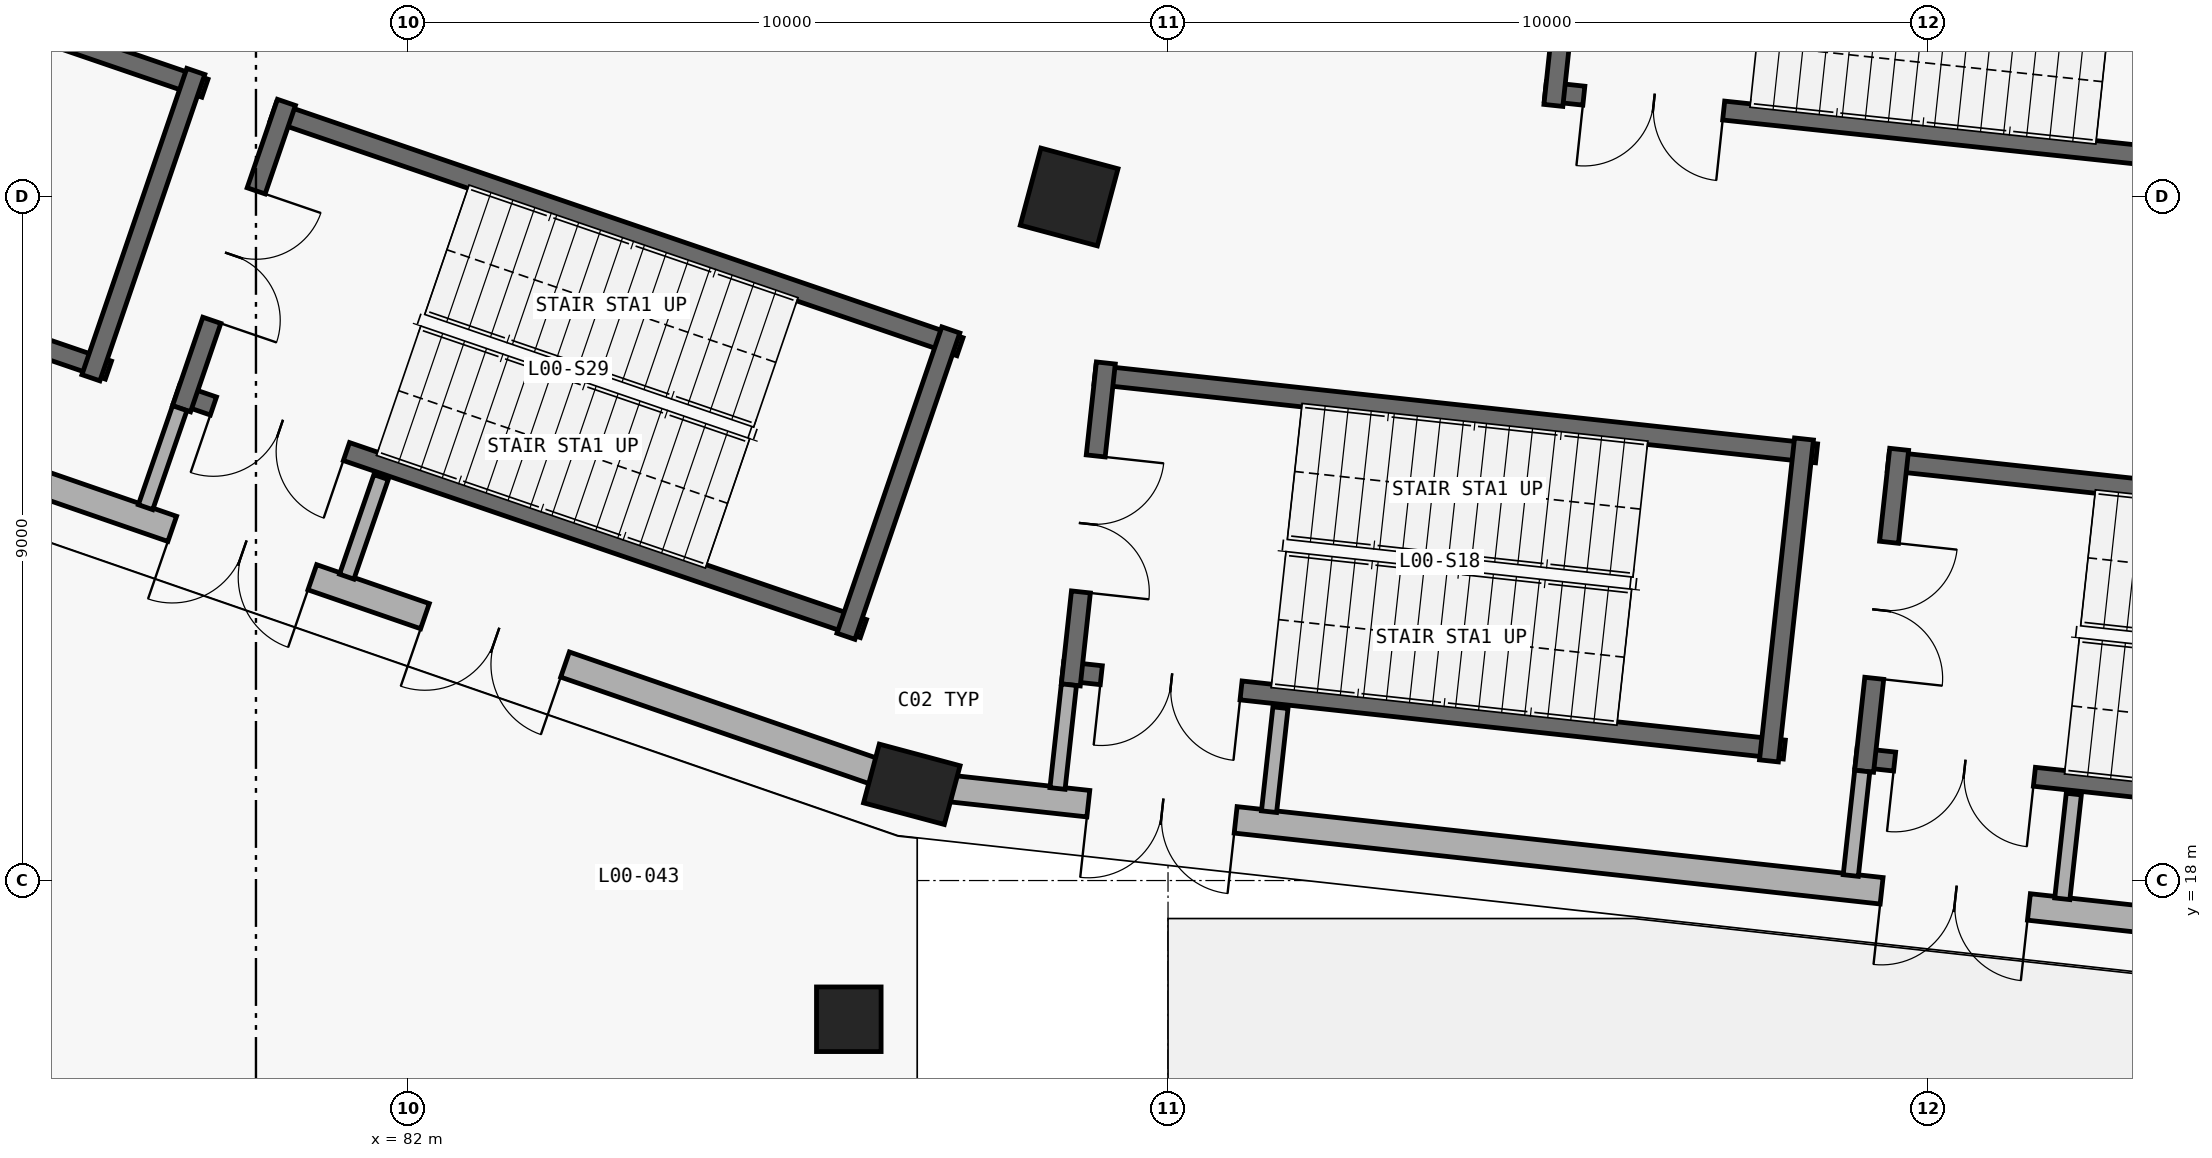
"""IFC4 building model, lengths in metres.
Left out: names, types, materials, properties, quantities, classifications, styles, units other than length and angle.
Written with IfcOpenShell. Run it as: python <this file> out.ifc"""

import sys

from ifc_helpers import new_model, si_unit, direction, frame, frame_2d, origin, origin_2d, place, context, subcontext, project, spatial, rectangle, circle, extrude, element, fill, save


model = new_model("IFC4")
c1 = context("Model", 3, precision=1e-05, world=origin(), true_north=direction((0.0, 1.0)))
c2 = subcontext(c1, "Body", "Model", "MODEL_VIEW")
j1 = project(units=[si_unit("LENGTHUNIT", "METRE"), si_unit("PLANEANGLEUNIT", "RADIAN")], contexts=[c1])
p1 = place(None, origin())
s1 = spatial("IfcSite", under=j1, at=p1, CompositionType="ELEMENT")
p2 = place(p1, origin())
s2 = spatial("IfcBuilding", under=s1, at=p2, CompositionType="ELEMENT")
p3 = place(p2, origin())
s3 = spatial("IfcBuildingStorey", under=s2, at=p3, CompositionType="ELEMENT", Elevation=0.0)
p4 = place(p3, frame((88.629, 19.266, 0.0), z_axis=(0.0, 0.0, 1.0), x_axis=(0.258819045103, 0.965925826289, 0.0)))
e1 = element("IfcColumn", 1, at=p4, inside=s3, PredefinedType="COLUMN", context=c2, shape_type="SweptSolid", body=[
    extrude(rectangle(XDim=0.8, YDim=1.1, at=origin_2d()), origin(), (0.0, 0.0, 1.0), 5.4),
])
p5 = place(p3, frame((90.699, 26.993, 0.0), z_axis=(0.0, 0.0, 1.0), x_axis=(0.258819045103, 0.965925826289, 0.0)))
e2 = element("IfcColumn", 2, at=p5, inside=s3, PredefinedType="COLUMN", context=c2, shape_type="SweptSolid", body=[
    extrude(rectangle(XDim=1.05, YDim=1.05, at=origin_2d()), origin(), (0.0, 0.0, 1.0), 5.4),
])
p6 = place(p3, frame((87.8, 16.175, 0.0), z_axis=(0.0, 0.0, 1.0), x_axis=(1.0, 0.0, 0.0)))
e3 = element("IfcColumn", 3, at=p6, inside=s3, PredefinedType="COLUMN", context=c2, shape_type="SweptSolid", body=[
    extrude(circle(Radius=0.425, at=origin_2d()), origin(), (0.0, 0.0, 1.0), 5.4),
])
p7 = place(p3, frame((88.131, 19.438, 0.0), z_axis=(0.0, 0.0, 1.0), x_axis=(-0.945215757663, 0.326446276538, 0.0)))
e4 = element("IfcWall", 4, at=p7, inside=s3, PredefinedType="STANDARD", context=c2, shape_type="SweptSolid", body=[
    extrude(rectangle(XDim=21.979, YDim=0.35, at=frame_2d((10.99, 0.0))), origin(), (0.0, 0.0, 1.0), 4.165),
])
p8 = place(p7, frame((18.318, 0.0, 0.0)))
e5 = element("IfcOpeningElement", 5, at=p8, cuts=e4, PredefinedType="OPENING", context=c2, shape_type="SweptSolid", body=[
    extrude(rectangle(XDim=1.95, YDim=2.25, at=frame_2d((0.975, 1.125))), frame((0.0, 0.185, 0.0), z_axis=(0.0, -1.0, 0.0), x_axis=(1.0, 0.0, 0.0)), (0.0, 0.0, 1.0), 0.37),
])
p9 = place(p7, frame((7.818, 0.0, 0.0)))
e6 = element("IfcOpeningElement", 6, at=p9, cuts=e4, PredefinedType="OPENING", context=c2, shape_type="SweptSolid", body=[
    extrude(rectangle(XDim=1.95, YDim=2.25, at=frame_2d((0.975, 1.125))), frame((0.0, 0.185, 0.0), z_axis=(0.0, -1.0, 0.0), x_axis=(1.0, 0.0, 0.0)), (0.0, 0.0, 1.0), 0.37),
])
p10 = place(p7, frame((4.3, 0.0, 0.0)))
e7 = element("IfcOpeningElement", 7, at=p10, cuts=e4, PredefinedType="OPENING", context=c2, shape_type="SweptSolid", body=[
    extrude(rectangle(XDim=1.95, YDim=2.25, at=frame_2d((0.975, 1.125))), frame((0.0, 0.185, 0.0), z_axis=(0.0, -1.0, 0.0), x_axis=(1.0, 0.0, 0.0)), (0.0, 0.0, 1.0), 0.37),
])
p11 = place(p3, frame((111.475, 16.758, 0.0), z_axis=(0.0, 0.0, 1.0), x_axis=(-0.994028735725, 0.10911861689, 0.0)))
e8 = element("IfcWall", 8, at=p11, inside=s3, PredefinedType="STANDARD", context=c2, shape_type="SweptSolid", body=[
    extrude(rectangle(XDim=22.452, YDim=0.35, at=frame_2d((11.226, 0.0))), origin(), (0.0, 0.0, 1.0), 4.165),
])
p12 = place(p11, frame((18.697, 0.0, 0.0)))
e9 = element("IfcOpeningElement", 9, at=p12, cuts=e8, PredefinedType="OPENING", context=c2, shape_type="SweptSolid", body=[
    extrude(rectangle(XDim=1.95, YDim=2.25, at=frame_2d((0.975, 1.125))), frame((0.0, 0.185, 0.0), z_axis=(0.0, -1.0, 0.0), x_axis=(1.0, 0.0, 0.0)), (0.0, 0.0, 1.0), 0.37),
])
p13 = place(p11, frame((8.197, 0.0, 0.0)))
e10 = element("IfcOpeningElement", 10, at=p13, cuts=e8, PredefinedType="OPENING", context=c2, shape_type="SweptSolid", body=[
    extrude(rectangle(XDim=1.95, YDim=2.25, at=frame_2d((0.975, 1.125))), frame((0.0, 0.185, 0.0), z_axis=(0.0, -1.0, 0.0), x_axis=(1.0, 0.0, 0.0)), (0.0, 0.0, 1.0), 0.37),
])
p14 = place(p11, frame((4.413, 0.0, 0.0)))
e11 = element("IfcOpeningElement", 11, at=p14, cuts=e8, PredefinedType="OPENING", context=c2, shape_type="SweptSolid", body=[
    extrude(rectangle(XDim=1.95, YDim=2.25, at=frame_2d((0.975, 1.125))), frame((0.0, 0.185, 0.0), z_axis=(0.0, -1.0, 0.0), x_axis=(1.0, 0.0, 0.0)), (0.0, 0.0, 1.0), 0.37),
])
p15 = place(p3, frame((78.059, 24.715, 0.0), z_axis=(0.0, 0.0, 1.0), x_axis=(-0.946064424228, 0.323978556712, 0.0)))
e12 = element("IfcWall", 12, at=p15, inside=s3, PredefinedType="SHEAR", context=c2, shape_type="SweptSolid", body=[
    extrude(rectangle(XDim=9.55, YDim=0.25, at=frame_2d((4.775, 0.0))), origin(), (0.0, 0.0, 1.0), 5.1),
])
p16 = place(p15, frame((7.19, 0.0, 0.0)))
e13 = element("IfcOpeningElement", 13, at=p16, cuts=e12, PredefinedType="OPENING", context=c2, shape_type="SweptSolid", body=[
    extrude(rectangle(XDim=1.85, YDim=2.3, at=frame_2d((0.925, 1.15))), frame((0.0, 0.135, 0.0), z_axis=(0.0, -1.0, 0.0), x_axis=(1.0, 0.0, 0.0)), (0.0, 0.0, 1.0), 0.27),
])
p17 = place(p3, frame((79.328, 28.424, 0.0), z_axis=(0.0, 0.0, 1.0), x_axis=(-0.946064424228, 0.323978556712, 0.0)))
e14 = element("IfcWall", 14, at=p17, inside=s3, PredefinedType="SHEAR", context=c2, shape_type="SweptSolid", body=[
    extrude(rectangle(XDim=9.55, YDim=0.25, at=frame_2d((4.775, 0.0))), origin(), (0.0, 0.0, 1.0), 5.1),
])
p18 = place(p3, frame((77.828, 24.615, 0.0), z_axis=(0.0, 0.0, 1.0), x_axis=(0.323971192516, 0.946066946056, 0.0)))
e15 = element("IfcWall", 15, at=p18, inside=s3, PredefinedType="SHEAR", context=c2, shape_type="SweptSolid", body=[
    extrude(rectangle(XDim=4.26, YDim=0.25, at=frame_2d((2.13, 0.0))), origin(), (0.0, 0.0, 1.0), 5.1),
])
p19 = place(p3, frame((100.109, 19.723, 0.0), z_axis=(0.0, 0.0, 1.0), x_axis=(-0.994127555169, 0.108214620337, 0.0)))
e16 = element("IfcWall", 16, at=p19, inside=s3, PredefinedType="SHEAR", context=c2, shape_type="SweptSolid", body=[
    extrude(rectangle(XDim=9.55, YDim=0.25, at=frame_2d((4.775, 0.0))), origin(), (0.0, 0.0, 1.0), 5.1),
])
p20 = place(p19, frame((7.19, 0.0, 0.0)))
e17 = element("IfcOpeningElement", 17, at=p20, cuts=e16, PredefinedType="OPENING", context=c2, shape_type="SweptSolid", body=[
    extrude(rectangle(XDim=1.85, YDim=2.3, at=frame_2d((0.925, 1.15))), frame((0.0, 0.135, 0.0), z_axis=(0.0, -1.0, 0.0), x_axis=(1.0, 0.0, 0.0)), (0.0, 0.0, 1.0), 0.27),
])
p21 = place(p3, frame((100.533, 23.62, 0.0), z_axis=(0.0, 0.0, 1.0), x_axis=(-0.994127555169, 0.108214620337, 0.0)))
e18 = element("IfcWall", 18, at=p21, inside=s3, PredefinedType="SHEAR", context=c2, shape_type="SweptSolid", body=[
    extrude(rectangle(XDim=9.55, YDim=0.25, at=frame_2d((4.775, 0.0))), origin(), (0.0, 0.0, 1.0), 5.1),
])
p22 = place(p3, frame((91.182, 24.809, 0.0), z_axis=(0.0, 0.0, 1.0), x_axis=(-0.108198315262, -0.994129329903, 0.0)))
e19 = element("IfcWall", 19, at=p22, inside=s3, PredefinedType="SHEAR", context=c2, shape_type="SweptSolid", body=[
    extrude(rectangle(XDim=4.26, YDim=0.25, at=frame_2d((2.13, 0.0))), origin(), (0.0, 0.0, 1.0), 5.1),
])
p23 = place(p22, frame((1.23, 0.0, 0.0)))
e20 = element("IfcOpeningElement", 20, at=p23, cuts=e19, PredefinedType="OPENING", context=c2, shape_type="SweptSolid", body=[
    extrude(rectangle(XDim=1.8, YDim=2.25, at=frame_2d((0.9, 1.125))), frame((0.0, 0.135, 0.0), z_axis=(0.0, -1.0, 0.0), x_axis=(1.0, 0.0, 0.0)), (0.0, 0.0, 1.0), 0.27),
])
p24 = place(p3, frame((99.906, 19.574, 0.0), z_axis=(0.0, 0.0, 1.0), x_axis=(0.108198315262, 0.994129329903, 0.0)))
e21 = element("IfcWall", 21, at=p24, inside=s3, PredefinedType="SHEAR", context=c2, shape_type="SweptSolid", body=[
    extrude(rectangle(XDim=4.26, YDim=0.25, at=frame_2d((2.13, 0.0))), origin(), (0.0, 0.0, 1.0), 5.1),
])
p25 = place(p3, frame((87.992, 21.314, 0.0), z_axis=(0.0, 0.0, 1.0), x_axis=(-0.946072259645, 0.323955675256, 0.0)))
e22 = element("IfcWall", 22, at=p25, inside=s3, PredefinedType="SHEAR", context=c2, shape_type="SweptSolid", body=[
    extrude(rectangle(XDim=9.55, YDim=0.25, at=frame_2d((4.775, 0.0))), origin(), (0.0, 0.0, 1.0), 5.1),
])
p26 = place(p25, frame((7.19, 0.0, 0.0)))
e23 = element("IfcOpeningElement", 23, at=p26, cuts=e22, PredefinedType="OPENING", context=c2, shape_type="SweptSolid", body=[
    extrude(rectangle(XDim=1.85, YDim=2.3, at=frame_2d((0.925, 1.15))), frame((0.0, 0.135, 0.0), z_axis=(0.0, -1.0, 0.0), x_axis=(1.0, 0.0, 0.0)), (0.0, 0.0, 1.0), 0.27),
])
p27 = place(p3, frame((89.262, 25.023, 0.0), z_axis=(0.0, 0.0, 1.0), x_axis=(-0.946064424228, 0.323978556712, 0.0)))
e24 = element("IfcWall", 24, at=p27, inside=s3, PredefinedType="SHEAR", context=c2, shape_type="SweptSolid", body=[
    extrude(rectangle(XDim=9.55, YDim=0.25, at=frame_2d((4.775, 0.0))), origin(), (0.0, 0.0, 1.0), 5.1),
])
p28 = place(p3, frame((80.401, 28.237, 0.0), z_axis=(0.0, 0.0, 1.0), x_axis=(-0.323971192516, -0.946066946056, 0.0)))
e25 = element("IfcWall", 25, at=p28, inside=s3, PredefinedType="SHEAR", context=c2, shape_type="SweptSolid", body=[
    extrude(rectangle(XDim=4.26, YDim=0.25, at=frame_2d((2.13, 0.0))), origin(), (0.0, 0.0, 1.0), 5.1),
])
p29 = place(p28, frame((1.23, 0.0, 0.0)))
e26 = element("IfcOpeningElement", 26, at=p29, cuts=e25, PredefinedType="OPENING", context=c2, shape_type="SweptSolid", body=[
    extrude(rectangle(XDim=1.8, YDim=2.25, at=frame_2d((0.9, 1.125))), frame((0.0, 0.135, 0.0), z_axis=(0.0, -1.0, 0.0), x_axis=(1.0, 0.0, 0.0)), (0.0, 0.0, 1.0), 0.27),
])
p30 = place(p3, frame((87.762, 21.213, 0.0), z_axis=(0.0, 0.0, 1.0), x_axis=(0.323971192516, 0.946066946056, 0.0)))
e27 = element("IfcWall", 27, at=p30, inside=s3, PredefinedType="SHEAR", context=c2, shape_type="SweptSolid", body=[
    extrude(rectangle(XDim=4.26, YDim=0.25, at=frame_2d((2.13, 0.0))), origin(), (0.0, 0.0, 1.0), 5.1),
])
p31 = place(p3, frame((110.547, 18.587, 0.0), z_axis=(0.0, 0.0, 1.0), x_axis=(-0.994127555169, 0.108214620337, 0.0)))
e28 = element("IfcWall", 28, at=p31, inside=s3, PredefinedType="SHEAR", context=c2, shape_type="SweptSolid", body=[
    extrude(rectangle(XDim=9.55, YDim=0.25, at=frame_2d((4.775, 0.0))), origin(), (0.0, 0.0, 1.0), 5.1),
])
p32 = place(p31, frame((7.19, 0.0, 0.0)))
e29 = element("IfcOpeningElement", 29, at=p32, cuts=e28, PredefinedType="OPENING", context=c2, shape_type="SweptSolid", body=[
    extrude(rectangle(XDim=1.85, YDim=2.3, at=frame_2d((0.925, 1.15))), frame((0.0, 0.135, 0.0), z_axis=(0.0, -1.0, 0.0), x_axis=(1.0, 0.0, 0.0)), (0.0, 0.0, 1.0), 0.27),
])
p33 = place(p3, frame((110.971, 22.484, 0.0), z_axis=(0.0, 0.0, 1.0), x_axis=(-0.994127555169, 0.108214620337, 0.0)))
e30 = element("IfcWall", 30, at=p33, inside=s3, PredefinedType="SHEAR", context=c2, shape_type="SweptSolid", body=[
    extrude(rectangle(XDim=9.55, YDim=0.25, at=frame_2d((4.775, 0.0))), origin(), (0.0, 0.0, 1.0), 5.1),
])
p34 = place(p3, frame((101.62, 23.673, 0.0), z_axis=(0.0, 0.0, 1.0), x_axis=(-0.108198315262, -0.994129329903, 0.0)))
e31 = element("IfcWall", 31, at=p34, inside=s3, PredefinedType="SHEAR", context=c2, shape_type="SweptSolid", body=[
    extrude(rectangle(XDim=4.26, YDim=0.25, at=frame_2d((2.13, 0.0))), origin(), (0.0, 0.0, 1.0), 5.1),
])
p35 = place(p34, frame((1.23, 0.0, 0.0)))
e32 = element("IfcOpeningElement", 32, at=p35, cuts=e31, PredefinedType="OPENING", context=c2, shape_type="SweptSolid", body=[
    extrude(rectangle(XDim=1.8, YDim=2.25, at=frame_2d((0.9, 1.125))), frame((0.0, 0.135, 0.0), z_axis=(0.0, -1.0, 0.0), x_axis=(1.0, 0.0, 0.0)), (0.0, 0.0, 1.0), 0.27),
])
p36 = place(p3, frame((106.361, 27.38, 0.0), z_axis=(0.0, 0.0, 1.0), x_axis=(-0.994382608826, 0.105845298736, 0.0)))
e33 = element("IfcWall", 33, at=p36, inside=s3, PredefinedType="SHEAR", context=c2, shape_type="SweptSolid", body=[
    extrude(rectangle(XDim=9.45, YDim=0.25, at=frame_2d((4.725, 0.0))), origin(), (0.0, 0.0, 1.0), 5.1),
])
p37 = place(p36, frame((7.09, 0.0, 0.0)))
e34 = element("IfcOpeningElement", 34, at=p37, cuts=e33, PredefinedType="OPENING", context=c2, shape_type="SweptSolid", body=[
    extrude(rectangle(XDim=1.85, YDim=2.3, at=frame_2d((0.925, 1.15))), frame((0.0, 0.135, 0.0), z_axis=(0.0, -1.0, 0.0), x_axis=(1.0, 0.0, 0.0)), (0.0, 0.0, 1.0), 0.27),
])
p38 = place(p3, frame((97.49, 32.135, 0.0), z_axis=(0.0, 0.0, 1.0), x_axis=(-0.105856095603, -0.994381459513, 0.0)))
e35 = element("IfcWall", 35, at=p38, inside=s3, PredefinedType="SHEAR", context=c2, shape_type="SweptSolid", body=[
    extrude(rectangle(XDim=3.96, YDim=0.25, at=frame_2d((1.98, 0.0))), origin(), (0.0, 0.0, 1.0), 5.1),
])
p39 = place(p38, frame((1.08, 0.0, 0.0)))
e36 = element("IfcOpeningElement", 36, at=p39, cuts=e35, PredefinedType="OPENING", context=c2, shape_type="SweptSolid", body=[
    extrude(rectangle(XDim=1.8, YDim=2.25, at=frame_2d((0.9, 1.125))), frame((0.0, 0.135, 0.0), z_axis=(0.0, -1.0, 0.0), x_axis=(1.0, 0.0, 0.0)), (0.0, 0.0, 1.0), 0.27),
])
p40 = place(p3, frame((90.696, 20.577, 0.0), z_axis=(0.0, 0.0, 1.0), x_axis=(-0.109105210456, -0.994030207313, 0.0)))
e37 = element("IfcWall", 37, at=p40, inside=s3, PredefinedType="PARTITIONING", context=c2, shape_type="SweptSolid", body=[
    extrude(rectangle(XDim=1.374, YDim=0.2, at=frame_2d((0.687, 0.0))), origin(), (0.0, 0.0, 1.0), 4.165),
])
p41 = place(p3, frame((93.479, 20.274, 0.0), z_axis=(0.0, 0.0, 1.0), x_axis=(-0.109301909368, -0.994008597854, 0.0)))
e38 = element("IfcWall", 38, at=p41, inside=s3, PredefinedType="PARTITIONING", context=c2, shape_type="SweptSolid", body=[
    extrude(rectangle(XDim=1.376, YDim=0.2, at=frame_2d((0.688, 0.0))), origin(), (0.0, 0.0, 1.0), 4.165),
])
p42 = place(p3, frame((78.997, 24.215, 0.0), z_axis=(0.0, 0.0, 1.0), x_axis=(-0.326410930849, -0.945227964156, 0.0)))
e39 = element("IfcWall", 39, at=p42, inside=s3, PredefinedType="PARTITIONING", context=c2, shape_type="SweptSolid", body=[
    extrude(rectangle(XDim=1.378, YDim=0.2, at=frame_2d((0.689, 0.0))), origin(), (0.0, 0.0, 1.0), 4.165),
])
p43 = place(p3, frame((81.646, 23.308, 0.0), z_axis=(0.0, 0.0, 1.0), x_axis=(-0.32614815498, -0.945318666378, 0.0)))
e40 = element("IfcWall", 40, at=p43, inside=s3, PredefinedType="PARTITIONING", context=c2, shape_type="SweptSolid", body=[
    extrude(rectangle(XDim=1.385, YDim=0.2, at=frame_2d((0.693, 0.0))), origin(), (0.0, 0.0, 1.0), 4.165),
])
p44 = place(p3, frame((101.134, 19.441, 0.0), z_axis=(0.0, 0.0, 1.0), x_axis=(-0.109094546517, -0.994031377734, 0.0)))
e41 = element("IfcWall", 41, at=p44, inside=s3, PredefinedType="PARTITIONING", context=c2, shape_type="SweptSolid", body=[
    extrude(rectangle(XDim=1.383, YDim=0.2, at=frame_2d((0.691, 0.0))), origin(), (0.0, 0.0, 1.0), 4.165),
])
p45 = place(p3, frame((103.917, 19.138, 0.0), z_axis=(0.0, 0.0, 1.0), x_axis=(-0.109213425596, -0.994018323609, 0.0)))
e42 = element("IfcWall", 42, at=p45, inside=s3, PredefinedType="PARTITIONING", context=c2, shape_type="SweptSolid", body=[
    extrude(rectangle(XDim=1.386, YDim=0.2, at=frame_2d((0.693, 0.0))), origin(), (0.0, 0.0, 1.0), 4.165),
])
p46 = place(p9, origin())
e43 = element("IfcDoor", 43, at=p46, inside=s3, OperationType="DOUBLE_DOOR_SINGLE_SWING", PredefinedType="DOOR", context=c2, shape_type="SweptSolid", body=[
    extrude(rectangle(XDim=1.95, YDim=2.25, at=frame_2d((0.975, 1.125))), frame((0.0, 0.025, 0.0), z_axis=(0.0, -1.0, 0.0), x_axis=(1.0, 0.0, 0.0)), (0.0, 0.0, 1.0), 0.05),
])
fill(e6, e43)
p47 = place(p10, origin())
e44 = element("IfcDoor", 44, at=p47, inside=s3, OperationType="DOUBLE_DOOR_SINGLE_SWING", PredefinedType="DOOR", context=c2, shape_type="SweptSolid", body=[
    extrude(rectangle(XDim=1.95, YDim=2.25, at=frame_2d((0.975, 1.125))), frame((0.0, 0.025, 0.0), z_axis=(0.0, -1.0, 0.0), x_axis=(1.0, 0.0, 0.0)), (0.0, 0.0, 1.0), 0.05),
])
fill(e7, e44)
p48 = place(p12, origin())
e45 = element("IfcDoor", 45, at=p48, inside=s3, OperationType="DOUBLE_DOOR_SINGLE_SWING", PredefinedType="DOOR", context=c2, shape_type="SweptSolid", body=[
    extrude(rectangle(XDim=1.95, YDim=2.25, at=frame_2d((0.975, 1.125))), frame((0.0, 0.025, 0.0), z_axis=(0.0, -1.0, 0.0), x_axis=(1.0, 0.0, 0.0)), (0.0, 0.0, 1.0), 0.05),
])
fill(e9, e45)
p49 = place(p13, origin())
e46 = element("IfcDoor", 46, at=p49, inside=s3, OperationType="DOUBLE_DOOR_SINGLE_SWING", PredefinedType="DOOR", context=c2, shape_type="SweptSolid", body=[
    extrude(rectangle(XDim=1.95, YDim=2.25, at=frame_2d((0.975, 1.125))), frame((0.0, 0.025, 0.0), z_axis=(0.0, -1.0, 0.0), x_axis=(1.0, 0.0, 0.0)), (0.0, 0.0, 1.0), 0.05),
])
fill(e10, e46)
p50 = place(p23, origin())
e47 = element("IfcDoor", 47, at=p50, inside=s3, OperationType="DOUBLE_DOOR_SINGLE_SWING", PredefinedType="DOOR", context=c2, shape_type="SweptSolid", body=[
    extrude(rectangle(XDim=1.8, YDim=2.25, at=frame_2d((0.9, 1.125))), frame((0.0, 0.025, 0.0), z_axis=(0.0, -1.0, 0.0), x_axis=(1.0, 0.0, 0.0)), (0.0, 0.0, 1.0), 0.05),
])
fill(e20, e47)
p51 = place(p20, origin())
e48 = element("IfcDoor", 48, at=p51, inside=s3, OperationType="DOUBLE_DOOR_SINGLE_SWING", PredefinedType="DOOR", context=c2, shape_type="SweptSolid", body=[
    extrude(rectangle(XDim=1.85, YDim=2.3, at=frame_2d((0.925, 1.15))), frame((0.0, 0.025, 0.0), z_axis=(0.0, -1.0, 0.0), x_axis=(1.0, 0.0, 0.0)), (0.0, 0.0, 1.0), 0.05),
])
fill(e17, e48)
p52 = place(p29, origin())
e49 = element("IfcDoor", 49, at=p52, inside=s3, OperationType="DOUBLE_DOOR_SINGLE_SWING", PredefinedType="DOOR", context=c2, shape_type="SweptSolid", body=[
    extrude(rectangle(XDim=1.8, YDim=2.25, at=frame_2d((0.9, 1.125))), frame((0.0, 0.025, 0.0), z_axis=(0.0, -1.0, 0.0), x_axis=(1.0, 0.0, 0.0)), (0.0, 0.0, 1.0), 0.05),
])
fill(e26, e49)
p53 = place(p26, origin())
e50 = element("IfcDoor", 50, at=p53, inside=s3, OperationType="DOUBLE_DOOR_SINGLE_SWING", PredefinedType="DOOR", context=c2, shape_type="SweptSolid", body=[
    extrude(rectangle(XDim=1.85, YDim=2.3, at=frame_2d((0.925, 1.15))), frame((0.0, 0.025, 0.0), z_axis=(0.0, -1.0, 0.0), x_axis=(1.0, 0.0, 0.0)), (0.0, 0.0, 1.0), 0.05),
])
fill(e23, e50)
p54 = place(p35, origin())
e51 = element("IfcDoor", 51, at=p54, inside=s3, OperationType="DOUBLE_DOOR_SINGLE_SWING", PredefinedType="DOOR", context=c2, shape_type="SweptSolid", body=[
    extrude(rectangle(XDim=1.8, YDim=2.25, at=frame_2d((0.9, 1.125))), frame((0.0, 0.025, 0.0), z_axis=(0.0, -1.0, 0.0), x_axis=(1.0, 0.0, 0.0)), (0.0, 0.0, 1.0), 0.05),
])
fill(e32, e51)
p55 = place(p32, origin())
e52 = element("IfcDoor", 52, at=p55, inside=s3, OperationType="DOUBLE_DOOR_SINGLE_SWING", PredefinedType="DOOR", context=c2, shape_type="SweptSolid", body=[
    extrude(rectangle(XDim=1.85, YDim=2.3, at=frame_2d((0.925, 1.15))), frame((0.0, 0.025, 0.0), z_axis=(0.0, -1.0, 0.0), x_axis=(1.0, 0.0, 0.0)), (0.0, 0.0, 1.0), 0.05),
])
fill(e29, e52)
p56 = place(p37, origin())
e53 = element("IfcDoor", 53, at=p56, inside=s3, OperationType="DOUBLE_DOOR_SINGLE_SWING", PredefinedType="DOOR", context=c2, shape_type="SweptSolid", body=[
    extrude(rectangle(XDim=1.85, YDim=2.3, at=frame_2d((0.925, 1.15))), frame((0.0, 0.025, 0.0), z_axis=(0.0, -1.0, 0.0), x_axis=(1.0, 0.0, 0.0)), (0.0, 0.0, 1.0), 0.05),
])
fill(e34, e53)
save(model, sys.argv[1])
